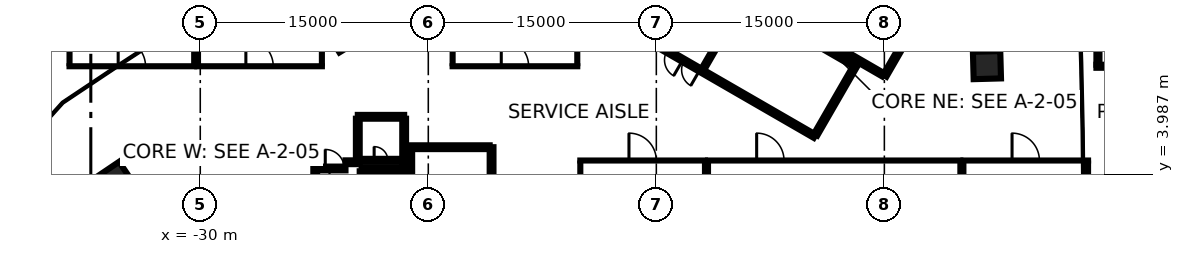
"""IFC4 building model, lengths in metres.
Left out: names, types, materials, properties, quantities, classifications, styles, units other than length and angle.
Written with IfcOpenShell. Run it as: python <this file> out.ifc"""

import sys

from ifc_helpers import new_model, si_unit, direction, frame, frame_2d, origin, origin_2d, place, context, subcontext, project, spatial, rectangle, extrude, element, fill, save


model = new_model("IFC4")
c1 = context("Model", 3, precision=1e-05, world=origin(), true_north=direction((0.0, 1.0)))
c2 = subcontext(c1, "Body", "Model", "MODEL_VIEW")
j1 = project(units=[si_unit("LENGTHUNIT", "METRE"), si_unit("PLANEANGLEUNIT", "RADIAN")], contexts=[c1])
p1 = place(None, origin())
s1 = spatial("IfcSite", under=j1, at=p1, CompositionType="ELEMENT")
p2 = place(p1, origin())
s2 = spatial("IfcBuilding", under=s1, at=p2, CompositionType="ELEMENT")
p3 = place(p2, frame((0.0, 0.0, -12.0)))
s3 = spatial("IfcBuildingStorey", under=s2, at=p3, CompositionType="ELEMENT", Elevation=-12.0)
for number, where, z_axis, x_axis in (
    (1, (21.749, 11.174, 0.0), (0.0, 0.0, 1.0), (1.0, 0.027, 0.0)),
    (2, (-35.583, 3.565, 0.0), (0.0, 0.0, 1.0), (-0.559, 0.829, 0.0)),
):
    element("IfcColumn", number, at=place(p3, frame(where, z_axis=z_axis, x_axis=x_axis)), inside=s3, PredefinedType="COLUMN", context=c2, shape_type="SweptSolid", body=[
        extrude(rectangle(XDim=1.8, YDim=1.8, at=origin_2d()), origin(), (0.0, 0.0, 1.0), 4.4),
    ])
p4 = place(p3, frame((-10.837, 5.775, 0.0), z_axis=(0.0, 0.0, 1.0), x_axis=(0.0, -1.0, 0.0)))
e3 = element("IfcWall", 3, at=p4, inside=s3, PredefinedType="SHEAR", context=c2, shape_type="SweptSolid", body=[
    extrude(rectangle(XDim=11.55, YDim=0.25, at=frame_2d((5.775, 0.0))), origin(), (0.0, 0.0, 1.0), 4.4),
])
p5 = place(p4, frame((10.025, 0.0, 0.0)))
e4 = element("IfcOpeningElement", 4, at=p5, cuts=e3, PredefinedType="OPENING", context=c2, shape_type="SweptSolid", body=[
    extrude(rectangle(XDim=1.2, YDim=2.1, at=frame_2d((0.6, 1.05))), frame((0.0, 0.135, 0.0), z_axis=(0.0, -1.0, 0.0), x_axis=(1.0, 0.0, 0.0)), (0.0, 0.0, 1.0), 0.27),
])
p6 = place(p4, frame((8.725, 0.0, 0.0)))
e5 = element("IfcOpeningElement", 5, at=p6, cuts=e3, PredefinedType="OPENING", context=c2, shape_type="SweptSolid", body=[
    extrude(rectangle(XDim=1.2, YDim=2.1, at=frame_2d((0.6, 1.05))), frame((0.0, 0.135, 0.0), z_axis=(0.0, -1.0, 0.0), x_axis=(1.0, 0.0, 0.0)), (0.0, 0.0, 1.0), 0.27),
])
p7 = place(p3, frame((-16.472, 5.775, 0.0), z_axis=(0.0, 0.0, 1.0), x_axis=(1.0, 0.0, 0.0)))
e6 = element("IfcWall", 6, at=p7, inside=s3, PredefinedType="SHEAR", context=c2, shape_type="SweptSolid", body=[
    extrude(rectangle(XDim=5.51, YDim=0.25, at=frame_2d((2.755, 0.0))), origin(), (0.0, 0.0, 1.0), 4.4),
])
p8 = place(p3, frame((-19.637, 7.775, 0.0), z_axis=(0.0, 0.0, 1.0), x_axis=(1.0, 0.0, 0.0)))
e7 = element("IfcWall", 7, at=p8, inside=s3, PredefinedType="SHEAR", context=c2, shape_type="SweptSolid", body=[
    extrude(rectangle(XDim=3.05, YDim=0.25, at=frame_2d((1.525, 0.0))), origin(), (0.0, 0.0, 1.0), 4.4),
])
for number, where, z_axis, x_axis in (
    (8, (-16.587, 7.65, 0.0), (0.0, 0.0, 1.0), (0.0, -1.0, 0.0)),
    (9, (-19.637, 4.785, 0.0), (0.0, 0.0, 1.0), (0.0, 1.0, 0.0)),
):
    element("IfcWall", number, at=place(p3, frame(where, z_axis=z_axis, x_axis=x_axis)), inside=s3, PredefinedType="SHEAR", context=c2, shape_type="SweptSolid", body=[
        extrude(rectangle(XDim=2.865, YDim=0.25, at=frame_2d((1.432, 0.0))), origin(), (0.0, 0.0, 1.0), 4.4),
    ])
p9 = place(p3, frame((-16.302, 4.315, 0.0), z_axis=(0.0, 0.0, 1.0), x_axis=(-1.0, 0.0, 0.0)))
e10 = element("IfcWall", 10, at=p9, inside=s3, PredefinedType="SHEAR", context=c2, shape_type="SweptSolid", body=[
    extrude(rectangle(XDim=3.085, YDim=0.25, at=frame_2d((1.542, 0.0))), origin(), (0.0, 0.0, 1.0), 4.4),
])
p10 = place(p3, frame((-16.187, 3.2, 0.0), z_axis=(0.0, 0.0, 1.0), x_axis=(0.0, 1.0, 0.0)))
e11 = element("IfcWall", 11, at=p10, inside=s3, PredefinedType="SHEAR", context=c2, shape_type="SweptSolid", body=[
    extrude(rectangle(XDim=2.449, YDim=0.25, at=frame_2d((1.225, 0.0))), origin(), (0.0, 0.0, 1.0), 4.4),
])
p11 = place(p3, frame((-22.437, 2.4, 0.0), z_axis=(0.0, 0.0, 1.0), x_axis=(0.0, 1.0, 0.0)))
e12 = element("IfcWall", 12, at=p11, inside=s3, PredefinedType="SHEAR", context=c2, shape_type="SweptSolid", body=[
    extrude(rectangle(XDim=1.975, YDim=0.25, at=frame_2d((0.987, 0.0))), origin(), (0.0, 0.0, 1.0), 4.4),
])
p12 = place(p3, frame((-22.312, 4.375, 0.0), z_axis=(0.0, 0.0, 1.0), x_axis=(1.0, 0.0, 0.0)))
e13 = element("IfcWall", 13, at=p12, inside=s3, PredefinedType="SHEAR", context=c2, shape_type="SweptSolid", body=[
    extrude(rectangle(XDim=1.865, YDim=0.25, at=frame_2d((0.932, 0.0))), origin(), (0.0, 0.0, 1.0), 4.4),
])
p13 = place(p12, frame((0.535, 0.0, 0.0)))
e14 = element("IfcOpeningElement", 14, at=p13, cuts=e13, PredefinedType="OPENING", context=c2, shape_type="SweptSolid", body=[
    extrude(rectangle(XDim=1.25, YDim=2.1, at=frame_2d((0.625, 1.05))), frame((0.0, 0.135, 0.0), z_axis=(0.0, -1.0, 0.0), x_axis=(1.0, 0.0, 0.0)), (0.0, 0.0, 1.0), 0.27),
])
p14 = place(p3, frame((-19.387, 4.19, 0.0), z_axis=(0.0, 0.0, 1.0), x_axis=(0.0, -1.0, 0.0)))
e15 = element("IfcWall", 15, at=p14, inside=s3, PredefinedType="SHEAR", context=c2, shape_type="SweptSolid", body=[
    extrude(rectangle(XDim=0.989, YDim=0.25, at=frame_2d((0.495, 0.0))), origin(), (0.0, 0.0, 1.0), 4.4),
])
p15 = place(p3, frame((-20.447, 4.785, 0.0), z_axis=(0.0, 0.0, 1.0), x_axis=(1.0, 0.0, 0.0)))
e16 = element("IfcWall", 16, at=p15, inside=s3, PredefinedType="SHEAR", context=c2, shape_type="SweptSolid", body=[
    extrude(rectangle(XDim=0.685, YDim=0.25, at=frame_2d((0.342, 0.0))), origin(), (0.0, 0.0, 1.0), 4.4),
])
p16 = place(p3, frame((-16.577, 4.785, 0.0), z_axis=(0.0, 0.0, 1.0), x_axis=(0.0, -1.0, 0.0)))
e17 = element("IfcWall", 17, at=p16, inside=s3, PredefinedType="SHEAR", context=c2, shape_type="SweptSolid", body=[
    extrude(rectangle(XDim=0.344, YDim=0.25, at=frame_2d((0.172, 0.0))), origin(), (0.0, 0.0, 1.0), 4.4),
])
p17 = place(p3, frame((-19.511, 4.91, 0.0), z_axis=(0.0, 0.0, 1.0), x_axis=(1.0, 0.0, 0.0)))
e18 = element("IfcWall", 18, at=p17, inside=s3, PredefinedType="SHEAR", context=c2, shape_type="SweptSolid", body=[
    extrude(rectangle(XDim=2.798, YDim=0.2, at=frame_2d((1.399, 0.0))), origin(), (0.0, 0.0, 1.0), 4.4),
])
p18 = place(p17, frame((0.949, 0.0, 0.0)))
e19 = element("IfcOpeningElement", 19, at=p18, cuts=e18, PredefinedType="OPENING", context=c2, shape_type="SweptSolid", body=[
    extrude(rectangle(XDim=0.9, YDim=2.1, at=frame_2d((0.45, 1.05))), frame((0.0, 0.11, 0.0), z_axis=(0.0, -1.0, 0.0), x_axis=(1.0, 0.0, 0.0)), (0.0, 0.0, 1.0), 0.22),
])
p19 = place(p3, frame((10.42, 6.498, 0.0), z_axis=(0.0, 0.0, 1.0), x_axis=(-0.866021906294, 0.500006057782, 0.0)))
e20 = element("IfcWall", 20, at=p19, inside=s3, PredefinedType="SHEAR", context=c2, shape_type="SweptSolid", body=[
    extrude(rectangle(XDim=11.55, YDim=0.25, at=frame_2d((5.775, 0.0))), origin(), (0.0, 0.0, 1.0), 4.4),
])
p20 = place(p19, frame((10.025, 0.0, 0.0)))
e21 = element("IfcOpeningElement", 21, at=p20, cuts=e20, PredefinedType="OPENING", context=c2, shape_type="SweptSolid", body=[
    extrude(rectangle(XDim=1.2, YDim=2.1, at=frame_2d((0.6, 1.05))), frame((0.0, 0.135, 0.0), z_axis=(0.0, -1.0, 0.0), x_axis=(1.0, 0.0, 0.0)), (0.0, 0.0, 1.0), 0.27),
])
p21 = place(p19, frame((8.725, 0.0, 0.0)))
e22 = element("IfcOpeningElement", 22, at=p21, cuts=e20, PredefinedType="OPENING", context=c2, shape_type="SweptSolid", body=[
    extrude(rectangle(XDim=1.2, YDim=2.1, at=frame_2d((0.6, 1.05))), frame((0.0, 0.135, 0.0), z_axis=(0.0, -1.0, 0.0), x_axis=(1.0, 0.0, 0.0)), (0.0, 0.0, 1.0), 0.27),
])
p22 = place(p3, frame((13.238, 11.378, 0.0), z_axis=(0.0, 0.0, 1.0), x_axis=(-0.500008851346, -0.866020293397, 0.0)))
e23 = element("IfcWall", 23, at=p22, inside=s3, PredefinedType="SHEAR", context=c2, shape_type="SweptSolid", body=[
    extrude(rectangle(XDim=5.51, YDim=0.25, at=frame_2d((2.755, 0.0))), origin(), (0.0, 0.0, 1.0), 4.4),
])
p23 = place(p3, frame((16.552, 13.119, 0.0), z_axis=(0.0, 0.0, 1.0), x_axis=(-0.499978833458, -0.866037623948, 0.0)))
e24 = element("IfcWall", 24, at=p23, inside=s3, PredefinedType="SHEAR", context=c2, shape_type="SweptSolid", body=[
    extrude(rectangle(XDim=3.05, YDim=0.25, at=frame_2d((1.525, 0.0))), origin(), (0.0, 0.0, 1.0), 4.4),
])
p24 = place(p3, frame((14.918, 10.54, 0.0), z_axis=(0.0, 0.0, 1.0), x_axis=(-0.866063538972, 0.499933942099, 0.0)))
e25 = element("IfcWall", 25, at=p24, inside=s3, PredefinedType="SHEAR", context=c2, shape_type="SweptSolid", body=[
    extrude(rectangle(XDim=2.865, YDim=0.25, at=frame_2d((1.432, 0.0))), origin(), (0.0, 0.0, 1.0), 4.4),
])
p25 = place(p3, frame((11.888, 11.961, 0.0), z_axis=(0.0, 0.0, 1.0), x_axis=(0.500003324108, 0.866023484601, 0.0)))
e26 = element("IfcWall", 26, at=p25, inside=s3, PredefinedType="SHEAR", context=c2, shape_type="SweptSolid", body=[
    extrude(rectangle(XDim=3.085, YDim=0.25, at=frame_2d((1.542, 0.0))), origin(), (0.0, 0.0, 1.0), 4.4),
])
p26 = place(p3, frame((10.865, 12.418, 0.0), z_axis=(0.0, 0.0, 1.0), x_axis=(0.866026229868, -0.499998569178, 0.0)))
e27 = element("IfcWall", 27, at=p26, inside=s3, PredefinedType="SHEAR", context=c2, shape_type="SweptSolid", body=[
    extrude(rectangle(XDim=2.449, YDim=0.25, at=frame_2d((1.225, 0.0))), origin(), (0.0, 0.0, 1.0), 4.4),
])
p27 = place(p3, frame((12.433, 11.964, 0.0), z_axis=(0.0, 0.0, 1.0), x_axis=(-0.866055875208, 0.499947218231, 0.0)))
e28 = element("IfcWall", 28, at=p27, inside=s3, PredefinedType="SHEAR", context=c2, shape_type="SweptSolid", body=[
    extrude(rectangle(XDim=0.345, YDim=0.25, at=frame_2d((0.172, 0.0))), origin(), (0.0, 0.0, 1.0), 4.4),
])
p28 = place(p3, frame((3.057, 10.895, 0.0), z_axis=(0.0, 0.0, 1.0), x_axis=(0.500012186204, 0.866018367962, 0.0)))
e29 = element("IfcWall", 29, at=p28, inside=s3, PredefinedType="SHEAR", context=c2, shape_type="SweptSolid", body=[
    extrude(rectangle(XDim=5.349, YDim=0.2, at=frame_2d((2.674, 0.0))), origin(), (0.0, 0.0, 1.0), 4.4),
])
p29 = place(p28, frame((2.099, 0.0, 0.0)))
e30 = element("IfcOpeningElement", 30, at=p29, cuts=e29, PredefinedType="OPENING", context=c2, shape_type="SweptSolid", body=[
    extrude(rectangle(XDim=0.9, YDim=2.1, at=frame_2d((0.45, 1.05))), frame((0.0, 0.11, 0.0), z_axis=(0.0, -1.0, 0.0), x_axis=(1.0, 0.0, 0.0)), (0.0, 0.0, 1.0), 0.22),
])
p30 = place(p3, frame((14.008, 14.442, 0.0), z_axis=(0.0, 0.0, 1.0), x_axis=(-0.499986818241, -0.866033014143, 0.0)))
e31 = element("IfcWall", 31, at=p30, inside=s3, PredefinedType="SHEAR", context=c2, shape_type="SweptSolid", body=[
    extrude(rectangle(XDim=2.798, YDim=0.2, at=frame_2d((1.399, 0.0))), origin(), (0.0, 0.0, 1.0), 4.4),
])
p31 = place(p30, frame((0.949, 0.0, 0.0)))
e32 = element("IfcOpeningElement", 32, at=p31, cuts=e31, PredefinedType="OPENING", context=c2, shape_type="SweptSolid", body=[
    extrude(rectangle(XDim=0.9, YDim=2.1, at=frame_2d((0.45, 1.05))), frame((0.0, 0.11, 0.0), z_axis=(0.0, -1.0, 0.0), x_axis=(1.0, 0.0, 0.0)), (0.0, 0.0, 1.0), 0.22),
])
p32 = place(p3, frame((-5.1, 4.9, 0.0), z_axis=(0.0, 0.0, 1.0), x_axis=(1.0, 0.0, 0.0)))
e33 = element("IfcWall", 33, at=p32, inside=s3, PredefinedType="PARTITIONING", context=c2, shape_type="SweptSolid", body=[
    extrude(rectangle(XDim=8.4, YDim=0.2, at=frame_2d((4.2, 0.0))), origin(), (0.0, 0.0, 1.0), 4.4),
])
p33 = place(p32, frame((3.3, 0.0, 0.0)))
e34 = element("IfcOpeningElement", 34, at=p33, cuts=e33, PredefinedType="OPENING", context=c2, shape_type="SweptSolid", body=[
    extrude(rectangle(XDim=1.8, YDim=2.1, at=frame_2d((0.9, 1.05))), frame((0.0, 0.11, 0.0), z_axis=(0.0, -1.0, 0.0), x_axis=(1.0, 0.0, 0.0)), (0.0, 0.0, 1.0), 0.22),
])
for number, where, z_axis, x_axis in (
    (35, (-5.0, 0.6, 0.0), (0.0, 0.0, 1.0), (0.0, 1.0, 0.0)),
    (36, (3.2, 0.6, 0.0), (0.0, 0.0, 1.0), (0.0, 1.0, 0.0)),
):
    element("IfcWall", number, at=place(p3, frame(where, z_axis=z_axis, x_axis=x_axis)), inside=s3, PredefinedType="PARTITIONING", context=c2, shape_type="SweptSolid", body=[
        extrude(rectangle(XDim=4.2, YDim=0.2, at=frame_2d((2.1, 0.0))), origin(), (0.0, 0.0, 1.0), 4.4),
    ])
p34 = place(p3, frame((3.3, 4.9, 0.0), z_axis=(0.0, 0.0, 1.0), x_axis=(1.0, 0.0, 0.0)))
e37 = element("IfcWall", 37, at=p34, inside=s3, PredefinedType="PARTITIONING", context=c2, shape_type="SweptSolid", body=[
    extrude(rectangle(XDim=16.8, YDim=0.2, at=frame_2d((8.4, 0.0))), origin(), (0.0, 0.0, 1.0), 4.4),
])
p35 = place(p34, frame((3.3, 0.0, 0.0)))
e38 = element("IfcOpeningElement", 38, at=p35, cuts=e37, PredefinedType="OPENING", context=c2, shape_type="SweptSolid", body=[
    extrude(rectangle(XDim=1.8, YDim=2.1, at=frame_2d((0.9, 1.05))), frame((0.0, 0.11, 0.0), z_axis=(0.0, -1.0, 0.0), x_axis=(1.0, 0.0, 0.0)), (0.0, 0.0, 1.0), 0.22),
])
for number, where, z_axis, x_axis in (
    (39, (3.4, 0.6, 0.0), (0.0, 0.0, 1.0), (0.0, 1.0, 0.0)),
    (40, (20.0, 0.6, 0.0), (0.0, 0.0, 1.0), (0.0, 1.0, 0.0)),
):
    element("IfcWall", number, at=place(p3, frame(where, z_axis=z_axis, x_axis=x_axis)), inside=s3, PredefinedType="PARTITIONING", context=c2, shape_type="SweptSolid", body=[
        extrude(rectangle(XDim=4.2, YDim=0.2, at=frame_2d((2.1, 0.0))), origin(), (0.0, 0.0, 1.0), 4.4),
    ])
p36 = place(p3, frame((20.1, 4.9, 0.0), z_axis=(0.0, 0.0, 1.0), x_axis=(1.0, 0.0, 0.0)))
e41 = element("IfcWall", 41, at=p36, inside=s3, PredefinedType="PARTITIONING", context=c2, shape_type="SweptSolid", body=[
    extrude(rectangle(XDim=8.4, YDim=0.2, at=frame_2d((4.2, 0.0))), origin(), (0.0, 0.0, 1.0), 4.4),
])
p37 = place(p36, frame((3.3, 0.0, 0.0)))
e42 = element("IfcOpeningElement", 42, at=p37, cuts=e41, PredefinedType="OPENING", context=c2, shape_type="SweptSolid", body=[
    extrude(rectangle(XDim=1.8, YDim=2.1, at=frame_2d((0.9, 1.05))), frame((0.0, 0.11, 0.0), z_axis=(0.0, -1.0, 0.0), x_axis=(1.0, 0.0, 0.0)), (0.0, 0.0, 1.0), 0.22),
])
p38 = place(p3, frame((20.2, 0.6, 0.0), z_axis=(0.0, 0.0, 1.0), x_axis=(0.0, 1.0, 0.0)))
e43 = element("IfcWall", 43, at=p38, inside=s3, PredefinedType="PARTITIONING", context=c2, shape_type="SweptSolid", body=[
    extrude(rectangle(XDim=4.2, YDim=0.2, at=frame_2d((2.1, 0.0))), origin(), (0.0, 0.0, 1.0), 4.4),
])
p39 = place(p3, frame((28.4, 0.4, 0.0), z_axis=(0.0, 0.0, 1.0), x_axis=(0.0, 1.0, 0.0)))
e44 = element("IfcWall", 44, at=p39, inside=s3, PredefinedType="PARTITIONING", context=c2, shape_type="SweptSolid", body=[
    extrude(rectangle(XDim=4.4, YDim=0.2, at=frame_2d((2.2, 0.0))), origin(), (0.0, 0.0, 1.0), 4.4),
])
p40 = place(p3, frame((-38.7, 11.1, 0.0), z_axis=(0.0, 0.0, 1.0), x_axis=(1.0, 0.0, 0.0)))
e45 = element("IfcWall", 45, at=p40, inside=s3, PredefinedType="PARTITIONING", context=c2, shape_type="SweptSolid", body=[
    extrude(rectangle(XDim=8.4, YDim=0.2, at=frame_2d((4.2, 0.0))), origin(), (0.0, 0.0, 1.0), 4.4),
])
p41 = place(p40, frame((3.3, 0.0, 0.0)))
e46 = element("IfcOpeningElement", 46, at=p41, cuts=e45, PredefinedType="OPENING", context=c2, shape_type="SweptSolid", body=[
    extrude(rectangle(XDim=1.8, YDim=2.1, at=frame_2d((0.9, 1.05))), frame((0.0, 0.11, 0.0), z_axis=(0.0, -1.0, 0.0), x_axis=(1.0, 0.0, 0.0)), (0.0, 0.0, 1.0), 0.22),
])
p42 = place(p3, frame((-38.6, 11.2, 0.0), z_axis=(0.0, 0.0, 1.0), x_axis=(0.0, 1.0, 0.0)))
e47 = element("IfcWall", 47, at=p42, inside=s3, PredefinedType="PARTITIONING", context=c2, shape_type="SweptSolid", body=[
    extrude(rectangle(XDim=4.2, YDim=0.2, at=frame_2d((2.1, 0.0))), origin(), (0.0, 0.0, 1.0), 4.4),
])
p43 = place(p3, frame((-30.4, 11.2, 0.0), z_axis=(0.0, 0.0, 1.0), x_axis=(0.0, 1.0, 0.0)))
e48 = element("IfcWall", 48, at=p43, inside=s3, PredefinedType="PARTITIONING", context=c2, shape_type="SweptSolid", body=[
    extrude(rectangle(XDim=4.4, YDim=0.2, at=frame_2d((2.2, 0.0))), origin(), (0.0, 0.0, 1.0), 4.4),
])
p44 = place(p3, frame((-30.3, 11.1, 0.0), z_axis=(0.0, 0.0, 1.0), x_axis=(1.0, 0.0, 0.0)))
e49 = element("IfcWall", 49, at=p44, inside=s3, PredefinedType="PARTITIONING", context=c2, shape_type="SweptSolid", body=[
    extrude(rectangle(XDim=8.4, YDim=0.2, at=frame_2d((4.2, 0.0))), origin(), (0.0, 0.0, 1.0), 4.4),
])
p45 = place(p44, frame((3.3, 0.0, 0.0)))
e50 = element("IfcOpeningElement", 50, at=p45, cuts=e49, PredefinedType="OPENING", context=c2, shape_type="SweptSolid", body=[
    extrude(rectangle(XDim=1.8, YDim=2.1, at=frame_2d((0.9, 1.05))), frame((0.0, 0.11, 0.0), z_axis=(0.0, -1.0, 0.0), x_axis=(1.0, 0.0, 0.0)), (0.0, 0.0, 1.0), 0.22),
])
p46 = place(p3, frame((-30.2, 11.2, 0.0), z_axis=(0.0, 0.0, 1.0), x_axis=(0.0, 1.0, 0.0)))
e51 = element("IfcWall", 51, at=p46, inside=s3, PredefinedType="PARTITIONING", context=c2, shape_type="SweptSolid", body=[
    extrude(rectangle(XDim=4.4, YDim=0.2, at=frame_2d((2.2, 0.0))), origin(), (0.0, 0.0, 1.0), 4.4),
])
p47 = place(p3, frame((-22.0, 11.2, 0.0), z_axis=(0.0, 0.0, 1.0), x_axis=(0.0, 1.0, 0.0)))
e52 = element("IfcWall", 52, at=p47, inside=s3, PredefinedType="PARTITIONING", context=c2, shape_type="SweptSolid", body=[
    extrude(rectangle(XDim=4.2, YDim=0.2, at=frame_2d((2.1, 0.0))), origin(), (0.0, 0.0, 1.0), 4.4),
])
p48 = place(p3, frame((-13.5, 11.1, 0.0), z_axis=(0.0, 0.0, 1.0), x_axis=(1.0, 0.0, 0.0)))
e53 = element("IfcWall", 53, at=p48, inside=s3, PredefinedType="PARTITIONING", context=c2, shape_type="SweptSolid", body=[
    extrude(rectangle(XDim=8.4, YDim=0.2, at=frame_2d((4.2, 0.0))), origin(), (0.0, 0.0, 1.0), 4.4),
])
p49 = place(p48, frame((3.3, 0.0, 0.0)))
e54 = element("IfcOpeningElement", 54, at=p49, cuts=e53, PredefinedType="OPENING", context=c2, shape_type="SweptSolid", body=[
    extrude(rectangle(XDim=1.8, YDim=2.1, at=frame_2d((0.9, 1.05))), frame((0.0, 0.11, 0.0), z_axis=(0.0, -1.0, 0.0), x_axis=(1.0, 0.0, 0.0)), (0.0, 0.0, 1.0), 0.22),
])
for number, where, z_axis, x_axis in (
    (55, (-13.4, 11.2, 0.0), (0.0, 0.0, 1.0), (0.0, 1.0, 0.0)),
    (56, (-5.2, 11.2, 0.0), (0.0, 0.0, 1.0), (0.0, 1.0, 0.0)),
):
    element("IfcWall", number, at=place(p3, frame(where, z_axis=z_axis, x_axis=x_axis)), inside=s3, PredefinedType="PARTITIONING", context=c2, shape_type="SweptSolid", body=[
        extrude(rectangle(XDim=4.2, YDim=0.2, at=frame_2d((2.1, 0.0))), origin(), (0.0, 0.0, 1.0), 4.4),
    ])
p50 = place(p3, frame((29.05, 11.2, 0.0), z_axis=(0.0, 0.0, 1.0), x_axis=(0.0, 1.0, 0.0)))
e57 = element("IfcWall", 57, at=p50, inside=s3, PredefinedType="SOLIDWALL", context=c2, shape_type="SweptSolid", body=[
    extrude(rectangle(XDim=9.6, YDim=0.2, at=frame_2d((4.8, 0.0))), origin(), (0.0, 0.0, 1.0), 4.4),
])
p51 = place(p3, frame((33.5, 11.1, 0.0), z_axis=(0.0, 0.0, 1.0), x_axis=(-1.0, 0.0, 0.0)))
e58 = element("IfcWall", 58, at=p51, inside=s3, PredefinedType="SOLIDWALL", context=c2, shape_type="SweptSolid", body=[
    extrude(rectangle(XDim=4.55, YDim=0.2, at=frame_2d((2.275, 0.0))), origin(), (0.0, 0.0, 1.0), 4.4),
])
p52 = place(p13, origin())
e59 = element("IfcDoor", 59, at=p52, inside=s3, OperationType="SINGLE_SWING_LEFT", PredefinedType="DOOR", context=c2, shape_type="SweptSolid", body=[
    extrude(rectangle(XDim=1.25, YDim=2.1, at=frame_2d((0.625, 1.05))), frame((0.0, 0.025, 0.0), z_axis=(0.0, -1.0, 0.0), x_axis=(1.0, 0.0, 0.0)), (0.0, 0.0, 1.0), 0.05),
])
fill(e14, e59)
p53 = place(p18, origin())
e60 = element("IfcDoor", 60, at=p53, inside=s3, OperationType="SINGLE_SWING_LEFT", PredefinedType="DOOR", context=c2, shape_type="SweptSolid", body=[
    extrude(rectangle(XDim=0.9, YDim=2.1, at=frame_2d((0.45, 1.05))), frame((0.0, 0.025, 0.0), z_axis=(0.0, -1.0, 0.0), x_axis=(1.0, 0.0, 0.0)), (0.0, 0.0, 1.0), 0.05),
])
fill(e19, e60)
p54 = place(p20, origin())
e61 = element("IfcDoor", 61, at=p54, inside=s3, OperationType="SINGLE_SWING_LEFT", PredefinedType="DOOR", context=c2, shape_type="SweptSolid", body=[
    extrude(rectangle(XDim=1.2, YDim=2.1, at=frame_2d((0.6, 1.05))), frame((0.0, 0.025, 0.0), z_axis=(0.0, -1.0, 0.0), x_axis=(1.0, 0.0, 0.0)), (0.0, 0.0, 1.0), 0.05),
])
fill(e21, e61)
p55 = place(p21, origin())
e62 = element("IfcDoor", 62, at=p55, inside=s3, OperationType="SINGLE_SWING_RIGHT", PredefinedType="DOOR", context=c2, shape_type="SweptSolid", body=[
    extrude(rectangle(XDim=1.2, YDim=2.1, at=frame_2d((0.6, 1.05))), frame((0.0, 0.025, 0.0), z_axis=(0.0, -1.0, 0.0), x_axis=(1.0, 0.0, 0.0)), (0.0, 0.0, 1.0), 0.05),
])
fill(e22, e62)
p56 = place(p33, origin())
e63 = element("IfcDoor", 63, at=p56, inside=s3, OperationType="DOUBLE_DOOR_SINGLE_SWING", PredefinedType="DOOR", context=c2, shape_type="SweptSolid", body=[
    extrude(rectangle(XDim=1.8, YDim=2.1, at=frame_2d((0.9, 1.05))), frame((0.0, 0.025, 0.0), z_axis=(0.0, -1.0, 0.0), x_axis=(1.0, 0.0, 0.0)), (0.0, 0.0, 1.0), 0.05),
])
fill(e34, e63)
p57 = place(p35, origin())
e64 = element("IfcDoor", 64, at=p57, inside=s3, OperationType="DOUBLE_DOOR_SINGLE_SWING", PredefinedType="DOOR", context=c2, shape_type="SweptSolid", body=[
    extrude(rectangle(XDim=1.8, YDim=2.1, at=frame_2d((0.9, 1.05))), frame((0.0, 0.025, 0.0), z_axis=(0.0, -1.0, 0.0), x_axis=(1.0, 0.0, 0.0)), (0.0, 0.0, 1.0), 0.05),
])
fill(e38, e64)
p58 = place(p37, origin())
e65 = element("IfcDoor", 65, at=p58, inside=s3, OperationType="DOUBLE_DOOR_SINGLE_SWING", PredefinedType="DOOR", context=c2, shape_type="SweptSolid", body=[
    extrude(rectangle(XDim=1.8, YDim=2.1, at=frame_2d((0.9, 1.05))), frame((0.0, 0.025, 0.0), z_axis=(0.0, -1.0, 0.0), x_axis=(1.0, 0.0, 0.0)), (0.0, 0.0, 1.0), 0.05),
])
fill(e42, e65)
p59 = place(p41, origin())
e66 = element("IfcDoor", 66, at=p59, inside=s3, OperationType="DOUBLE_DOOR_SINGLE_SWING", PredefinedType="DOOR", context=c2, shape_type="SweptSolid", body=[
    extrude(rectangle(XDim=1.8, YDim=2.1, at=frame_2d((0.9, 1.05))), frame((0.0, 0.025, 0.0), z_axis=(0.0, -1.0, 0.0), x_axis=(1.0, 0.0, 0.0)), (0.0, 0.0, 1.0), 0.05),
])
fill(e46, e66)
p60 = place(p45, origin())
e67 = element("IfcDoor", 67, at=p60, inside=s3, OperationType="DOUBLE_DOOR_SINGLE_SWING", PredefinedType="DOOR", context=c2, shape_type="SweptSolid", body=[
    extrude(rectangle(XDim=1.8, YDim=2.1, at=frame_2d((0.9, 1.05))), frame((0.0, 0.025, 0.0), z_axis=(0.0, -1.0, 0.0), x_axis=(1.0, 0.0, 0.0)), (0.0, 0.0, 1.0), 0.05),
])
fill(e50, e67)
p61 = place(p49, origin())
e68 = element("IfcDoor", 68, at=p61, inside=s3, OperationType="DOUBLE_DOOR_SINGLE_SWING", PredefinedType="DOOR", context=c2, shape_type="SweptSolid", body=[
    extrude(rectangle(XDim=1.8, YDim=2.1, at=frame_2d((0.9, 1.05))), frame((0.0, 0.025, 0.0), z_axis=(0.0, -1.0, 0.0), x_axis=(1.0, 0.0, 0.0)), (0.0, 0.0, 1.0), 0.05),
])
fill(e54, e68)
save(model, sys.argv[1])
